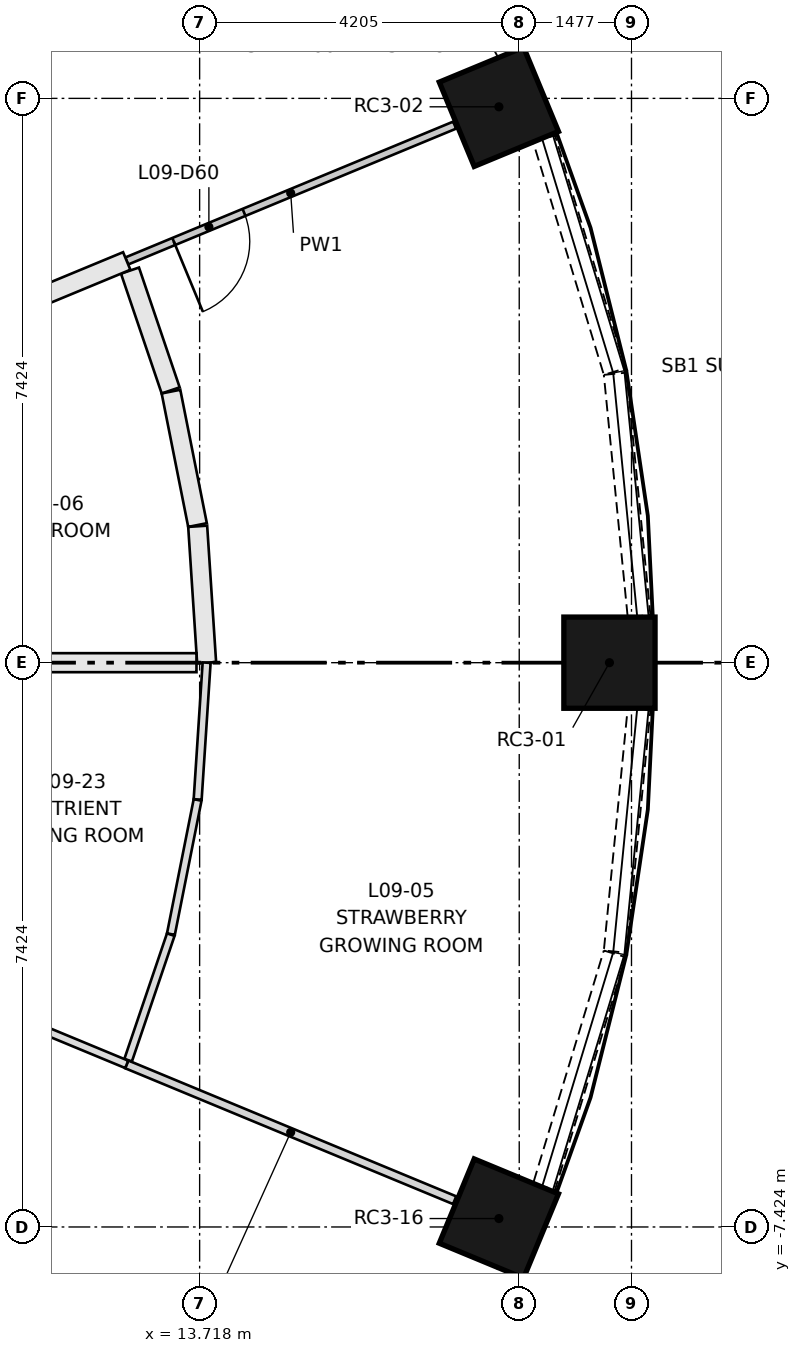
"""IFC4 building model, lengths in metres.
Left out: names, types, materials, properties, quantities, classifications, styles, units other than length and angle.
Written with IfcOpenShell. Run it as: python <this file> out.ifc"""

import sys

from ifc_helpers import new_model, si_unit, direction, frame, frame_2d, origin, origin_2d, place, context, subcontext, project, spatial, rectangle, extrude, element, fill, save


model = new_model("IFC4")
c1 = context("Model", 3, precision=1e-05, world=origin(), true_north=direction((0.0, 1.0)))
c2 = subcontext(c1, "Body", "Model", "MODEL_VIEW")
j1 = project(units=[si_unit("LENGTHUNIT", "METRE"), si_unit("PLANEANGLEUNIT", "RADIAN")], contexts=[c1])
p1 = place(None, origin())
s1 = spatial("IfcSite", under=j1, at=p1, CompositionType="ELEMENT")
p2 = place(p1, origin())
s2 = spatial("IfcBuilding", under=s1, at=p2, CompositionType="ELEMENT")
p3 = place(p2, frame((0.0, 0.0, 37.15)))
s3 = spatial("IfcBuildingStorey", under=s2, at=p3, CompositionType="ELEMENT", Elevation=37.15)
for number, where, z_axis, x_axis in (
    (1, (19.11, 0.0, 0.0), (0.0, 0.0, 1.0), (1.0, 0.0, 0.0)),
    (2, (17.655, 7.313, 0.0), (0.0, 0.0, 1.0), (0.924, 0.383, 0.0)),
    (3, (17.655, -7.313, 0.0), (0.0, 0.0, 1.0), (0.924, -0.383, 0.0)),
):
    element("IfcColumn", number, at=place(p3, frame(where, z_axis=z_axis, x_axis=x_axis)), inside=s3, PredefinedType="COLUMN", context=c2, shape_type="SweptSolid", body=[
        extrude(rectangle(XDim=1.2, YDim=1.2, at=origin_2d()), origin(), (0.0, 0.0, 1.0), 3.65),
    ])
p4 = place(p3, frame((19.5, 0.613, 0.0), z_axis=(0.0, 0.0, 1.0), x_axis=(-0.098002102993, 0.995186207606, 0.0)))
e4 = element("IfcWall", 4, at=p4, inside=s3, PredefinedType="SOLIDWALL", context=c2, shape_type="SweptSolid", body=[
    extrude(rectangle(XDim=3.204, YDim=0.3, at=frame_2d((1.602, 0.0))), origin(), (0.0, 0.0, 1.0), 0.9),
])
p5 = place(p3, frame((19.18, 3.83, 0.0), z_axis=(0.0, 0.0, 1.0), x_axis=(-0.290472877795, 0.956883225512, 0.0)))
e5 = element("IfcWall", 5, at=p5, inside=s3, PredefinedType="SOLIDWALL", context=c2, shape_type="SweptSolid", body=[
    extrude(rectangle(XDim=3.202, YDim=0.3, at=frame_2d((1.601, 0.0))), origin(), (0.0, 0.0, 1.0), 0.9),
])
for number, where, z_axis, x_axis in (
    (6, (17.78, 8.028, 0.0), (0.0, 0.0, 1.0), (-0.471, 0.882, 0.0)),
    (7, (16.27, -10.854, 0.0), (0.0, 0.0, 1.0), (0.471, 0.882, 0.0)),
):
    element("IfcWall", number, at=place(p3, frame(where, z_axis=z_axis, x_axis=x_axis)), inside=s3, PredefinedType="SOLIDWALL", context=c2, shape_type="SweptSolid", body=[
        extrude(rectangle(XDim=3.204, YDim=0.3, at=frame_2d((1.602, 0.0))), origin(), (0.0, 0.0, 1.0), 0.9),
    ])
p6 = place(p3, frame((18.25, -6.895, 0.0), z_axis=(0.0, 0.0, 1.0), x_axis=(0.290472877795, 0.956883225512, 0.0)))
e8 = element("IfcWall", 8, at=p6, inside=s3, PredefinedType="SOLIDWALL", context=c2, shape_type="SweptSolid", body=[
    extrude(rectangle(XDim=3.202, YDim=0.3, at=frame_2d((1.601, 0.0))), origin(), (0.0, 0.0, 1.0), 0.9),
])
p7 = place(p3, frame((19.186, -3.801, 0.0), z_axis=(0.0, 0.0, 1.0), x_axis=(0.098002102993, 0.995186207606, 0.0)))
e9 = element("IfcWall", 9, at=p7, inside=s3, PredefinedType="SOLIDWALL", context=c2, shape_type="SweptSolid", body=[
    extrude(rectangle(XDim=3.204, YDim=0.3, at=frame_2d((1.602, 0.0))), origin(), (0.0, 0.0, 1.0), 0.9),
])
p8 = place(p3, frame((13.337, 3.582, 0.0), z_axis=(0.0, 0.0, 1.0), x_axis=(-0.321458381335, 0.946923708157, 0.0)))
e10 = element("IfcWall", 10, at=p8, inside=s3, PredefinedType="PARTITIONING", context=c2, shape_type="SweptSolid", body=[
    extrude(rectangle(XDim=1.665, YDim=0.25, at=frame_2d((0.833, 0.0))), origin(), (0.0, 0.0, 1.0), 3.3),
])
p9 = place(p3, frame((13.69, 1.811, 0.0), z_axis=(0.0, 0.0, 1.0), x_axis=(-0.195014530736, 0.980800353182, 0.0)))
e11 = element("IfcWall", 11, at=p9, inside=s3, PredefinedType="PARTITIONING", context=c2, shape_type="SweptSolid", body=[
    extrude(rectangle(XDim=1.79, YDim=0.25, at=frame_2d((0.895, 0.0))), origin(), (0.0, 0.0, 1.0), 3.3),
])
p10 = place(p3, frame((13.81, 0.0, 0.0), z_axis=(0.0, 0.0, 1.0), x_axis=(-0.065437674742, 0.997856658406, 0.0)))
e12 = element("IfcWall", 12, at=p10, inside=s3, PredefinedType="PARTITIONING", context=c2, shape_type="SweptSolid", body=[
    extrude(rectangle(XDim=1.798, YDim=0.25, at=frame_2d((0.899, 0.0))), origin(), (0.0, 0.0, 1.0), 3.3),
])
p11 = place(p3, frame((17.073, 7.072, 0.0), z_axis=(0.0, 0.0, 1.0), x_axis=(-0.92387920118, -0.382684232268, 0.0)))
e13 = element("IfcWall", 13, at=p11, inside=s3, PredefinedType="PARTITIONING", context=c2, shape_type="SweptSolid", body=[
    extrude(rectangle(XDim=4.67, YDim=0.1, at=frame_2d((2.335, 0.0))), origin(), (0.0, 0.0, 1.0), 3.3),
])
p12 = place(p11, frame((3.0, 0.0, 0.0)))
e14 = element("IfcOpeningElement", 14, at=p12, cuts=e13, PredefinedType="OPENING", context=c2, shape_type="SweptSolid", body=[
    extrude(rectangle(XDim=1.0, YDim=2.1, at=frame_2d((0.5, 1.05))), frame((0.0, 0.06, 0.0), z_axis=(0.0, -1.0, 0.0), x_axis=(1.0, 0.0, 0.0)), (0.0, 0.0, 1.0), 0.12),
])
p13 = place(p3, frame((17.073, -7.072, 0.0), z_axis=(0.0, 0.0, 1.0), x_axis=(-0.92387920118, 0.382684232268, 0.0)))
e15 = element("IfcWall", 15, at=p13, inside=s3, PredefinedType="PARTITIONING", context=c2, shape_type="SweptSolid", body=[
    extrude(rectangle(XDim=4.67, YDim=0.11, at=frame_2d((2.335, 0.0))), origin(), (0.0, 0.0, 1.0), 3.3),
])
p14 = place(p3, frame((12.778, -5.229, 0.0), z_axis=(0.0, 0.0, 1.0), x_axis=(0.321513757885, 0.946904907311, 0.0)))
e16 = element("IfcWall", 16, at=p14, inside=s3, PredefinedType="PARTITIONING", context=c2, shape_type="SweptSolid", body=[
    extrude(rectangle(XDim=1.744, YDim=0.105, at=frame_2d((0.872, 0.0))), origin(), (0.0, 0.0, 1.0), 3.3),
])
p15 = place(p3, frame((13.34, -3.571, 0.0), z_axis=(0.0, 0.0, 1.0), x_axis=(0.195098478373, 0.980783657968, 0.0)))
e17 = element("IfcWall", 17, at=p15, inside=s3, PredefinedType="PARTITIONING", context=c2, shape_type="SweptSolid", body=[
    extrude(rectangle(XDim=1.8, YDim=0.105, at=frame_2d((0.9, 0.0))), origin(), (0.0, 0.0, 1.0), 3.3),
])
p16 = place(p3, frame((13.692, -1.799, 0.0), z_axis=(0.0, 0.0, 1.0), x_axis=(0.065395671101, 0.997859412042, 0.0)))
e18 = element("IfcWall", 18, at=p16, inside=s3, PredefinedType="PARTITIONING", context=c2, shape_type="SweptSolid", body=[
    extrude(rectangle(XDim=1.803, YDim=0.105, at=frame_2d((0.902, 0.0))), origin(), (0.0, 0.0, 1.0), 3.3),
])
p17 = place(p3, frame((10.047, 4.162, 0.0), z_axis=(0.0, 0.0, 1.0), x_axis=(0.92388200997, 0.382677451195, 0.0)))
e19 = element("IfcWall", 19, at=p17, inside=s3, PredefinedType="PARTITIONING", context=c2, shape_type="SweptSolid", body=[
    extrude(rectangle(XDim=2.935, YDim=0.25, at=frame_2d((1.468, 0.0))), origin(), (0.0, 0.0, 1.0), 3.3),
])
p18 = place(p3, frame((13.677, 0.0, 0.0), z_axis=(0.0, 0.0, 1.0), x_axis=(-1.0, 0.0, 0.0)))
e20 = element("IfcWall", 20, at=p18, inside=s3, PredefinedType="PARTITIONING", context=c2, shape_type="SweptSolid", body=[
    extrude(rectangle(XDim=3.677, YDim=0.25, at=frame_2d((1.839, 0.0))), origin(), (0.0, 0.0, 1.0), 3.3),
])
p19 = place(p3, frame((9.957, -4.124, 0.0), z_axis=(0.0, 0.0, 1.0), x_axis=(0.923860842545, -0.382728550819, 0.0)))
e21 = element("IfcWall", 21, at=p19, inside=s3, PredefinedType="PARTITIONING", context=c2, shape_type="SweptSolid", body=[
    extrude(rectangle(XDim=3.033, YDim=0.105, at=frame_2d((1.517, 0.0))), origin(), (0.0, 0.0, 1.0), 3.3),
])
p20 = place(p12, origin())
e22 = element("IfcDoor", 22, at=p20, inside=s3, OperationType="SINGLE_SWING_RIGHT", PredefinedType="DOOR", context=c2, shape_type="SweptSolid", body=[
    extrude(rectangle(XDim=1.0, YDim=2.1, at=frame_2d((0.5, 1.05))), frame((0.0, 0.025, 0.0), z_axis=(0.0, -1.0, 0.0), x_axis=(1.0, 0.0, 0.0)), (0.0, 0.0, 1.0), 0.05),
])
fill(e14, e22)
save(model, sys.argv[1])
